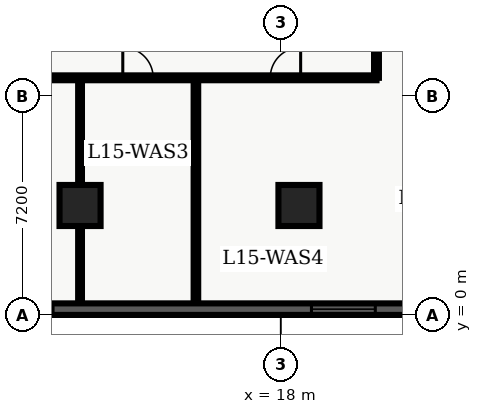
"""IFC4 building model, lengths in metres.
Left out: names, types, materials, properties, quantities, classifications, styles, units other than length and angle.
Written with IfcOpenShell. Run it as: python <this file> out.ifc"""

import sys

from ifc_helpers import new_model, entity, si_unit, converted_unit, direction, frame, origin_with_axes, origin_2d_with_axis, place, context, subcontext, project, spatial, polyline, rectangle, outline, extrude, element, fill, save


model = new_model("IFC4")
c1 = context("Model", 3, precision=1e-05, world=origin_with_axes(), true_north=direction((0.0, 1.0)))
c2 = subcontext(c1, "Body", "Model", "MODEL_VIEW")
j1 = project(units=[si_unit("LENGTHUNIT", "METRE"), converted_unit("PLANEANGLEUNIT", "DEGREE", entity("IfcPlaneAngleMeasure", 0.017), si_unit("PLANEANGLEUNIT", "RADIAN"), dimensions=[0, 0, 0, 0, 0, 0, 0])], contexts=[c1])
p1 = place(None, origin_with_axes())
s1 = spatial("IfcSite", under=j1, at=p1, CompositionType="ELEMENT")
p2 = place(p1, origin_with_axes())
s2 = spatial("IfcBuilding", under=s1, at=p2, CompositionType="ELEMENT")
p3 = place(p2, frame((0.0, 0.0, 63.9), z_axis=(0.0, 0.0, 1.0), x_axis=(1.0, 0.0, 0.0)))
s3 = spatial("IfcBuildingStorey", under=s2, at=p3, CompositionType="ELEMENT", Elevation=63.9)
for number, where, z_axis, x_axis in (
    (1, (11.4, 3.6, 0.0), (0.0, 0.0, 1.0), (1.0, 0.0, 0.0)),
    (2, (18.6, 3.6, 0.0), (0.0, 0.0, 1.0), (1.0, 0.0, 0.0)),
):
    element("IfcColumn", number, at=place(p3, frame(where, z_axis=z_axis, x_axis=x_axis)), inside=s3, PredefinedType="COLUMN", context=c2, shape_type="SweptSolid", body=[
        extrude(rectangle(XDim=1.35, YDim=1.35, at=origin_2d_with_axis()), origin_with_axes(), (0.0, 0.0, 1.0), 3.9),
    ])
p4 = place(p3, frame((2.6, 7.8, 0.0), z_axis=(0.0, 0.0, 1.0), x_axis=(1.0, 0.0, 0.0)))
e3 = element("IfcWall", 3, at=p4, inside=s3, PredefinedType="PARTITIONING", context=c2, shape_type="SweptSolid", body=[
    extrude(outline(polyline([(0.0, -0.08), (18.55, -0.08), (18.55, 0.08), (0.0, 0.08), (0.0, -0.08)])), origin_with_axes(), (0.0, 0.0, 1.0), 2.7),
])
p5 = place(p4, frame((1.825, 0.0, 0.0), z_axis=(0.0, 0.0, 1.0), x_axis=(1.0, 0.0, 0.0)))
e4 = element("IfcOpeningElement", 4, at=p5, cuts=e3, PredefinedType="OPENING", context=c2, shape_type="SweptSolid", body=[
    extrude(rectangle(XDim=1.0, YDim=0.18, at=origin_2d_with_axis()), origin_with_axes(), (0.0, 0.0, 1.0), 2.15),
])
p6 = place(p4, frame((6.229, 0.0, 0.0), z_axis=(0.0, 0.0, 1.0), x_axis=(1.0, 0.0, 0.0)))
e5 = element("IfcOpeningElement", 5, at=p6, cuts=e3, PredefinedType="OPENING", context=c2, shape_type="SweptSolid", body=[
    extrude(rectangle(XDim=1.0, YDim=0.18, at=origin_2d_with_axis()), origin_with_axes(), (0.0, 0.0, 1.0), 2.15),
])
p7 = place(p4, frame((10.706, 0.0, 0.0), z_axis=(0.0, 0.0, 1.0), x_axis=(1.0, 0.0, 0.0)))
e6 = element("IfcOpeningElement", 6, at=p7, cuts=e3, PredefinedType="OPENING", context=c2, shape_type="SweptSolid", body=[
    extrude(rectangle(XDim=1.0, YDim=0.18, at=origin_2d_with_axis()), origin_with_axes(), (0.0, 0.0, 1.0), 2.15),
])
p8 = place(p4, frame((15.556, 0.0, 0.0), z_axis=(0.0, 0.0, 1.0), x_axis=(1.0, 0.0, 0.0)))
e7 = element("IfcOpeningElement", 7, at=p8, cuts=e3, PredefinedType="OPENING", context=c2, shape_type="SweptSolid", body=[
    extrude(rectangle(XDim=1.0, YDim=0.18, at=origin_2d_with_axis()), origin_with_axes(), (0.0, 0.0, 1.0), 2.15),
])
p9 = place(p3, frame((21.15, 7.8, 0.0), z_axis=(0.0, 0.0, 1.0), x_axis=(0.0, 1.0, 0.0)))
e8 = element("IfcWall", 8, at=p9, inside=s3, PredefinedType="PARTITIONING", context=c2, shape_type="SweptSolid", body=[
    extrude(outline(polyline([(0.0, -0.08), (32.7, -0.08), (32.7, 0.08), (0.0, 0.08), (0.0, -0.08)])), origin_with_axes(), (0.0, 0.0, 1.0), 2.7),
])
p10 = place(p9, frame((5.775, 0.0, 0.0), z_axis=(0.0, 0.0, 1.0), x_axis=(1.0, 0.0, 0.0)))
e9 = element("IfcOpeningElement", 9, at=p10, cuts=e8, PredefinedType="OPENING", context=c2, shape_type="SweptSolid", body=[
    extrude(rectangle(XDim=1.05, YDim=0.18, at=origin_2d_with_axis()), origin_with_axes(), (0.0, 0.0, 1.0), 2.15),
])
p11 = place(p3, frame((11.4, 0.36, 0.0), z_axis=(0.0, 0.0, 1.0), x_axis=(0.0, 1.0, 0.0)))
e10 = element("IfcWall", 10, at=p11, inside=s3, PredefinedType="PARTITIONING", context=c2, shape_type="SweptSolid", body=[
    extrude(outline(polyline([(0.0, -0.062), (7.34, -0.062), (7.34, 0.062), (0.0, 0.062), (0.0, -0.062)])), origin_with_axes(), (0.0, 0.0, 1.0), 2.7),
])
p12 = place(p3, frame((15.211, 0.36, 0.0), z_axis=(0.0, 0.0, 1.0), x_axis=(0.0, 1.0, 0.0)))
e11 = element("IfcWall", 11, at=p12, inside=s3, PredefinedType="PARTITIONING", context=c2, shape_type="SweptSolid", body=[
    extrude(outline(polyline([(0.0, -0.075), (7.34, -0.075), (7.34, 0.075), (0.0, 0.075), (0.0, -0.075)])), origin_with_axes(), (0.0, 0.0, 1.0), 2.7),
])
p13 = place(p3, frame((57.22, 0.19, 0.0), z_axis=(0.0, 0.0, 1.0), x_axis=(-1.0, 0.0, 0.0)))
e12 = element("IfcWall", 12, at=p13, inside=s3, PredefinedType="SOLIDWALL", context=c2, shape_type="SweptSolid", body=[
    extrude(outline(polyline([(0.0, -0.19), (54.82, -0.19), (54.82, 0.19), (0.0, 0.19), (0.0, -0.19)])), origin_with_axes(), (0.0, 0.0, 1.0), 3.66),
])
p14 = place(p13, frame((3.037, 0.0, 0.45), z_axis=(0.0, 0.0, 1.0), x_axis=(1.0, 0.0, 0.0)))
e13 = element("IfcOpeningElement", 13, at=p14, cuts=e12, PredefinedType="OPENING", context=c2, shape_type="SweptSolid", body=[
    extrude(rectangle(XDim=2.1, YDim=0.4, at=origin_2d_with_axis()), origin_with_axes(), (0.0, 0.0, 1.0), 2.2),
])
p15 = place(p13, frame((7.912, 0.0, 0.45), z_axis=(0.0, 0.0, 1.0), x_axis=(1.0, 0.0, 0.0)))
e14 = element("IfcOpeningElement", 14, at=p15, cuts=e12, PredefinedType="OPENING", context=c2, shape_type="SweptSolid", body=[
    extrude(rectangle(XDim=2.1, YDim=0.4, at=origin_2d_with_axis()), origin_with_axes(), (0.0, 0.0, 1.0), 2.2),
])
p16 = place(p13, frame((12.786, 0.0, 0.45), z_axis=(0.0, 0.0, 1.0), x_axis=(1.0, 0.0, 0.0)))
e15 = element("IfcOpeningElement", 15, at=p16, cuts=e12, PredefinedType="OPENING", context=c2, shape_type="SweptSolid", body=[
    extrude(rectangle(XDim=2.1, YDim=0.4, at=origin_2d_with_axis()), origin_with_axes(), (0.0, 0.0, 1.0), 2.2),
])
p17 = place(p13, frame((17.661, 0.0, 0.45), z_axis=(0.0, 0.0, 1.0), x_axis=(1.0, 0.0, 0.0)))
e16 = element("IfcOpeningElement", 16, at=p17, cuts=e12, PredefinedType="OPENING", context=c2, shape_type="SweptSolid", body=[
    extrude(rectangle(XDim=2.1, YDim=0.4, at=origin_2d_with_axis()), origin_with_axes(), (0.0, 0.0, 1.0), 2.2),
])
p18 = place(p13, frame((22.535, 0.0, 0.45), z_axis=(0.0, 0.0, 1.0), x_axis=(1.0, 0.0, 0.0)))
e17 = element("IfcOpeningElement", 17, at=p18, cuts=e12, PredefinedType="OPENING", context=c2, shape_type="SweptSolid", body=[
    extrude(rectangle(XDim=2.1, YDim=0.4, at=origin_2d_with_axis()), origin_with_axes(), (0.0, 0.0, 1.0), 2.2),
])
p19 = place(p13, frame((27.41, 0.0, 0.45), z_axis=(0.0, 0.0, 1.0), x_axis=(1.0, 0.0, 0.0)))
e18 = element("IfcOpeningElement", 18, at=p19, cuts=e12, PredefinedType="OPENING", context=c2, shape_type="SweptSolid", body=[
    extrude(rectangle(XDim=2.1, YDim=0.4, at=origin_2d_with_axis()), origin_with_axes(), (0.0, 0.0, 1.0), 2.2),
])
p20 = place(p13, frame((32.285, 0.0, 0.45), z_axis=(0.0, 0.0, 1.0), x_axis=(1.0, 0.0, 0.0)))
e19 = element("IfcOpeningElement", 19, at=p20, cuts=e12, PredefinedType="OPENING", context=c2, shape_type="SweptSolid", body=[
    extrude(rectangle(XDim=2.1, YDim=0.4, at=origin_2d_with_axis()), origin_with_axes(), (0.0, 0.0, 1.0), 2.2),
])
p21 = place(p13, frame((37.159, 0.0, 0.45), z_axis=(0.0, 0.0, 1.0), x_axis=(1.0, 0.0, 0.0)))
e20 = element("IfcOpeningElement", 20, at=p21, cuts=e12, PredefinedType="OPENING", context=c2, shape_type="SweptSolid", body=[
    extrude(rectangle(XDim=2.1, YDim=0.4, at=origin_2d_with_axis()), origin_with_axes(), (0.0, 0.0, 1.0), 2.2),
])
p22 = place(p13, frame((47.758, 0.0, 0.45), z_axis=(0.0, 0.0, 1.0), x_axis=(1.0, 0.0, 0.0)))
e21 = element("IfcOpeningElement", 21, at=p22, cuts=e12, PredefinedType="OPENING", context=c2, shape_type="SweptSolid", body=[
    extrude(rectangle(XDim=2.1, YDim=0.4, at=origin_2d_with_axis()), origin_with_axes(), (0.0, 0.0, 1.0), 2.2),
])
p23 = place(p13, frame((52.633, 0.0, 0.45), z_axis=(0.0, 0.0, 1.0), x_axis=(1.0, 0.0, 0.0)))
e22 = element("IfcOpeningElement", 22, at=p23, cuts=e12, PredefinedType="OPENING", context=c2, shape_type="SweptSolid", body=[
    extrude(rectangle(XDim=2.1, YDim=0.4, at=origin_2d_with_axis()), origin_with_axes(), (0.0, 0.0, 1.0), 2.2),
])
p24 = place(p4, frame((10.706, 0.0, 0.0), z_axis=(0.0, 0.0, 1.0), x_axis=(1.0, 0.0, 0.0)))
e23 = element("IfcDoor", 23, at=p24, inside=s3, OperationType="SINGLE_SWING_LEFT", PredefinedType="DOOR", context=c2, shape_type="SweptSolid", body=[
    extrude(rectangle(XDim=1.0, YDim=0.09, at=origin_2d_with_axis()), origin_with_axes(), (0.0, 0.0, 1.0), 2.15),
])
fill(e6, e23)
p25 = place(p4, frame((15.556, 0.0, 0.0), z_axis=(0.0, 0.0, 1.0), x_axis=(1.0, 0.0, 0.0)))
e24 = element("IfcDoor", 24, at=p25, inside=s3, OperationType="SINGLE_SWING_RIGHT", PredefinedType="DOOR", context=c2, shape_type="SweptSolid", body=[
    extrude(rectangle(XDim=1.0, YDim=0.09, at=origin_2d_with_axis()), origin_with_axes(), (0.0, 0.0, 1.0), 2.15),
])
fill(e7, e24)
p26 = place(p13, frame((37.159, 0.0, 0.45), z_axis=(0.0, 0.0, 1.0), x_axis=(1.0, 0.0, 0.0)))
e25 = element("IfcWindow", 25, at=p26, inside=s3, PredefinedType="WINDOW", context=c2, shape_type="SweptSolid", body=[
    extrude(rectangle(XDim=2.1, YDim=0.09, at=origin_2d_with_axis()), origin_with_axes(), (0.0, 0.0, 1.0), 2.2),
])
fill(e20, e25)
p27 = place(p13, frame((47.758, 0.0, 0.45), z_axis=(0.0, 0.0, 1.0), x_axis=(1.0, 0.0, 0.0)))
e26 = element("IfcWindow", 26, at=p27, inside=s3, PredefinedType="WINDOW", context=c2, shape_type="SweptSolid", body=[
    extrude(rectangle(XDim=2.1, YDim=0.09, at=origin_2d_with_axis()), origin_with_axes(), (0.0, 0.0, 1.0), 2.2),
])
fill(e21, e26)
save(model, sys.argv[1])
